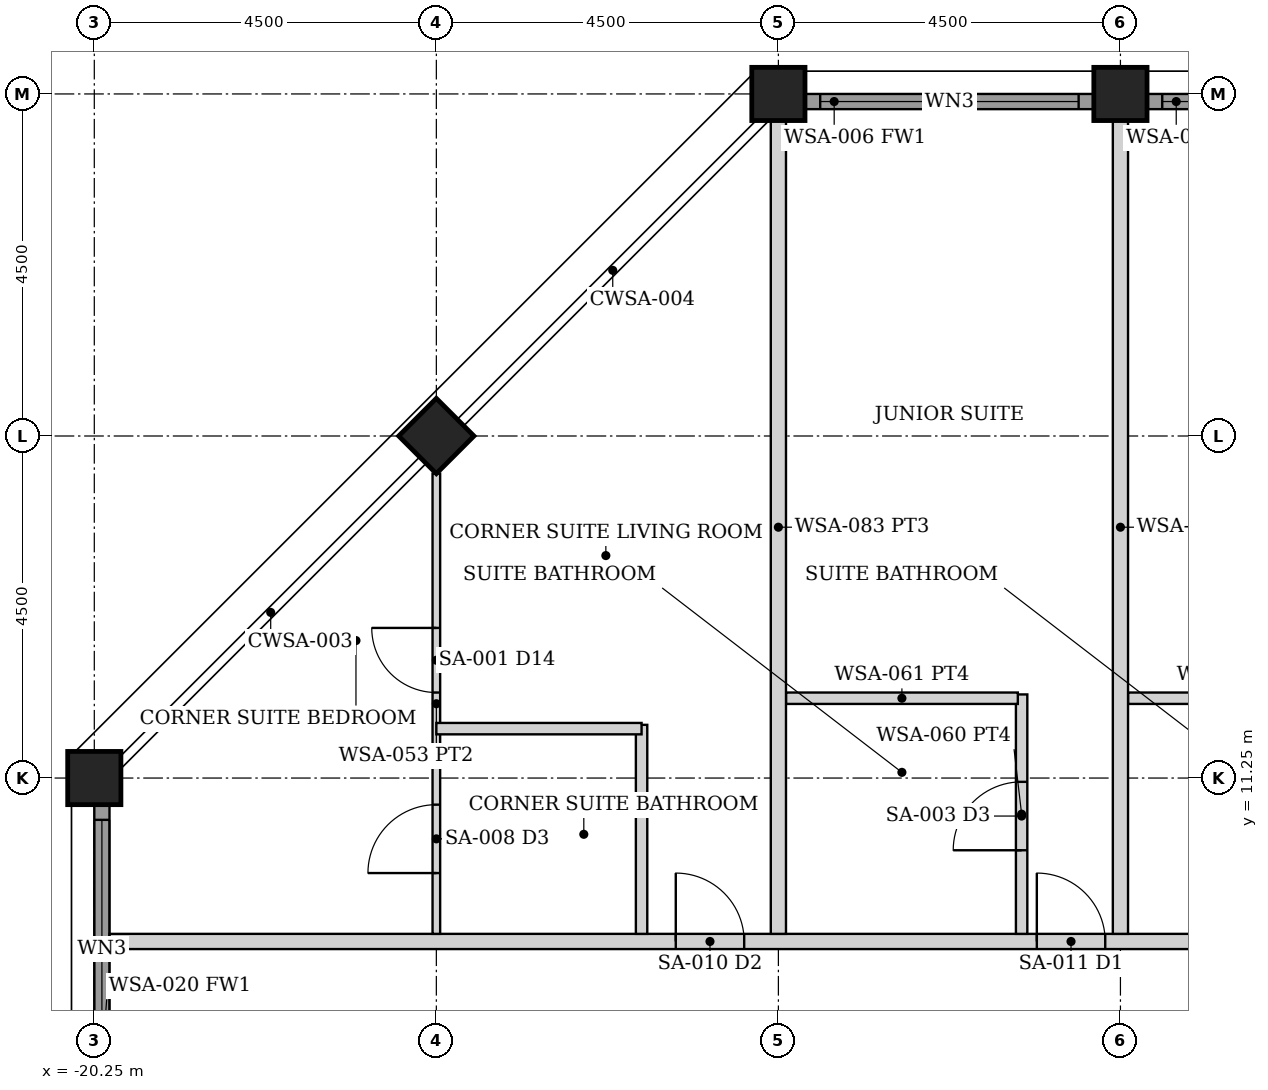
"""IFC4 building model, lengths in metres.
Left out: names, types, materials, properties, quantities, classifications, styles, units other than length and angle.
Written with IfcOpenShell. Run it as: python <this file> out.ifc"""

import sys

from ifc_helpers import new_model, si_unit, direction, frame, frame_2d, origin, origin_2d, place, context, subcontext, project, spatial, rectangle, hollow_rectangle, extrude, element, fill, save


model = new_model("IFC4")
c1 = context("Model", 3, precision=1e-05, world=origin(), true_north=direction((0.0, 1.0)))
c2 = subcontext(c1, "Body", "Model", "MODEL_VIEW")
j1 = project(units=[si_unit("LENGTHUNIT", "METRE"), si_unit("PLANEANGLEUNIT", "RADIAN")], contexts=[c1])
p1 = place(None, origin())
s1 = spatial("IfcSite", under=j1, at=p1, CompositionType="ELEMENT")
p2 = place(p1, origin())
s2 = spatial("IfcBuilding", under=s1, at=p2, CompositionType="ELEMENT")
p3 = place(p2, frame((0.0, 0.0, 200.8)))
s3 = spatial("IfcBuildingStorey", under=s2, at=p3, CompositionType="ELEMENT", Elevation=200.8)
for number, where, z_axis, x_axis in (
    (1, (-11.25, 20.25, 0.0), (0.0, 0.0, 1.0), (0.0, 1.0, 0.0)),
    (2, (-6.75, 20.25, 0.0), (0.0, 0.0, 1.0), (0.0, 1.0, 0.0)),
    (3, (-20.25, 11.25, 0.0), (0.0, 0.0, 1.0), (1.0, 0.0, 0.0)),
    (4, (-15.75, 15.75, 0.0), (0.0, 0.0, 1.0), (0.707, -0.707, 0.0)),
):
    element("IfcColumn", number, at=place(p3, frame(where, z_axis=z_axis, x_axis=x_axis)), inside=s3, PredefinedType="COLUMN", context=c2, shape_type="SweptSolid", body=[
        extrude(hollow_rectangle(XDim=0.7, YDim=0.7, WallThickness=0.045, at=origin_2d()), origin(), (0.0, 0.0, 1.0), 3.75),
    ])
p4 = place(p3, frame((-10.895, 20.15, 0.0), z_axis=(0.0, 0.0, 1.0), x_axis=(1.0, 0.0, 0.0)))
e5 = element("IfcWall", 5, at=p4, inside=s3, PredefinedType="SOLIDWALL", context=c2, shape_type="SweptSolid", body=[
    extrude(rectangle(XDim=3.79, YDim=0.2, at=frame_2d((1.895, 0.0))), origin(), (0.0, 0.0, 1.0), 2.629),
])
p5 = place(p4, frame((0.195, 0.0, 0.3)))
e6 = element("IfcOpeningElement", 6, at=p5, cuts=e5, PredefinedType="OPENING", context=c2, shape_type="SweptSolid", body=[
    extrude(rectangle(XDim=3.4, YDim=2.179, at=frame_2d((1.7, 1.089))), frame((0.0, 0.11, 0.0), z_axis=(0.0, -1.0, 0.0), x_axis=(1.0, 0.0, 0.0)), (0.0, 0.0, 1.0), 0.22),
])
p6 = place(p3, frame((-6.395, 20.15, 0.0), z_axis=(0.0, 0.0, 1.0), x_axis=(1.0, 0.0, 0.0)))
e7 = element("IfcWall", 7, at=p6, inside=s3, PredefinedType="SOLIDWALL", context=c2, shape_type="SweptSolid", body=[
    extrude(rectangle(XDim=3.79, YDim=0.2, at=frame_2d((1.895, 0.0))), origin(), (0.0, 0.0, 1.0), 2.629),
])
p7 = place(p6, frame((0.195, 0.0, 0.3)))
e8 = element("IfcOpeningElement", 8, at=p7, cuts=e7, PredefinedType="OPENING", context=c2, shape_type="SweptSolid", body=[
    extrude(rectangle(XDim=3.4, YDim=2.179, at=frame_2d((1.7, 1.089))), frame((0.0, 0.11, 0.0), z_axis=(0.0, -1.0, 0.0), x_axis=(1.0, 0.0, 0.0)), (0.0, 0.0, 1.0), 0.22),
])
p8 = place(p3, frame((-20.15, 7.105, 0.0), z_axis=(0.0, 0.0, 1.0), x_axis=(0.0, 1.0, 0.0)))
e9 = element("IfcWall", 9, at=p8, inside=s3, PredefinedType="SOLIDWALL", context=c2, shape_type="SweptSolid", body=[
    extrude(rectangle(XDim=3.79, YDim=0.2, at=frame_2d((1.895, 0.0))), origin(), (0.0, 0.0, 1.0), 2.629),
])
p9 = place(p8, frame((0.195, 0.0, 0.3)))
e10 = element("IfcOpeningElement", 10, at=p9, cuts=e9, PredefinedType="OPENING", context=c2, shape_type="SweptSolid", body=[
    extrude(rectangle(XDim=3.4, YDim=2.179, at=frame_2d((1.7, 1.089))), frame((0.0, 0.11, 0.0), z_axis=(0.0, -1.0, 0.0), x_axis=(1.0, 0.0, 0.0)), (0.0, 0.0, 1.0), 0.22),
])
p10 = place(p3, frame((-20.05, 9.1, 0.0), z_axis=(0.0, 0.0, 1.0), x_axis=(1.0, 0.0, 0.0)))
e11 = element("IfcWall", 11, at=p10, inside=s3, PredefinedType="PARTITIONING", context=c2, shape_type="SweptSolid", body=[
    extrude(rectangle(XDim=40.1, YDim=0.2, at=frame_2d((20.05, 0.0))), origin(), (0.0, 0.0, 1.0), 2.629),
])
p11 = place(p10, frame((12.2, 0.0, 0.0)))
e12 = element("IfcOpeningElement", 12, at=p11, cuts=e11, PredefinedType="OPENING", context=c2, shape_type="SweptSolid", body=[
    extrude(rectangle(XDim=0.9, YDim=2.1, at=frame_2d((0.45, 1.05))), frame((0.0, 0.11, 0.0), z_axis=(0.0, -1.0, 0.0), x_axis=(1.0, 0.0, 0.0)), (0.0, 0.0, 1.0), 0.22),
])
p12 = place(p10, frame((16.7, 0.0, 0.0)))
e13 = element("IfcOpeningElement", 13, at=p12, cuts=e11, PredefinedType="OPENING", context=c2, shape_type="SweptSolid", body=[
    extrude(rectangle(XDim=0.9, YDim=2.1, at=frame_2d((0.45, 1.05))), frame((0.0, 0.11, 0.0), z_axis=(0.0, -1.0, 0.0), x_axis=(1.0, 0.0, 0.0)), (0.0, 0.0, 1.0), 0.22),
])
p13 = place(p10, frame((21.2, 0.0, 0.0)))
e14 = element("IfcOpeningElement", 14, at=p13, cuts=e11, PredefinedType="OPENING", context=c2, shape_type="SweptSolid", body=[
    extrude(rectangle(XDim=0.9, YDim=2.1, at=frame_2d((0.45, 1.05))), frame((0.0, 0.11, 0.0), z_axis=(0.0, -1.0, 0.0), x_axis=(1.0, 0.0, 0.0)), (0.0, 0.0, 1.0), 0.22),
])
p14 = place(p10, frame((25.7, 0.0, 0.0)))
e15 = element("IfcOpeningElement", 15, at=p14, cuts=e11, PredefinedType="OPENING", context=c2, shape_type="SweptSolid", body=[
    extrude(rectangle(XDim=0.9, YDim=2.1, at=frame_2d((0.45, 1.05))), frame((0.0, 0.11, 0.0), z_axis=(0.0, -1.0, 0.0), x_axis=(1.0, 0.0, 0.0)), (0.0, 0.0, 1.0), 0.22),
])
p15 = place(p10, frame((30.2, 0.0, 0.0)))
e16 = element("IfcOpeningElement", 16, at=p15, cuts=e11, PredefinedType="OPENING", context=c2, shape_type="SweptSolid", body=[
    extrude(rectangle(XDim=0.9, YDim=2.1, at=frame_2d((0.45, 1.05))), frame((0.0, 0.11, 0.0), z_axis=(0.0, -1.0, 0.0), x_axis=(1.0, 0.0, 0.0)), (0.0, 0.0, 1.0), 0.22),
])
p16 = place(p10, frame((31.75, 0.0, 0.0)))
e17 = element("IfcOpeningElement", 17, at=p16, cuts=e11, PredefinedType="OPENING", context=c2, shape_type="SweptSolid", body=[
    extrude(rectangle(XDim=0.9, YDim=2.1, at=frame_2d((0.45, 1.05))), frame((0.0, 0.11, 0.0), z_axis=(0.0, -1.0, 0.0), x_axis=(1.0, 0.0, 0.0)), (0.0, 0.0, 1.0), 0.22),
])
p17 = place(p10, frame((7.45, 0.0, 0.0)))
e18 = element("IfcOpeningElement", 18, at=p17, cuts=e11, PredefinedType="OPENING", context=c2, shape_type="SweptSolid", body=[
    extrude(rectangle(XDim=0.9, YDim=2.1, at=frame_2d((0.45, 1.05))), frame((0.0, 0.11, 0.0), z_axis=(0.0, -1.0, 0.0), x_axis=(1.0, 0.0, 0.0)), (0.0, 0.0, 1.0), 0.22),
])
p18 = place(p3, frame((-8.05, 9.2, 0.0), z_axis=(0.0, 0.0, 1.0), x_axis=(0.0, 1.0, 0.0)))
e19 = element("IfcWall", 19, at=p18, inside=s3, PredefinedType="PARTITIONING", context=c2, shape_type="SweptSolid", body=[
    extrude(rectangle(XDim=3.15, YDim=0.15, at=frame_2d((1.575, 0.0))), origin(), (0.0, 0.0, 1.0), 2.629),
])
p19 = place(p18, frame((1.1, 0.0, 0.0)))
e20 = element("IfcOpeningElement", 20, at=p19, cuts=e19, PredefinedType="OPENING", context=c2, shape_type="SweptSolid", body=[
    extrude(rectangle(XDim=0.9, YDim=2.1, at=frame_2d((0.45, 1.05))), frame((0.0, 0.085, 0.0), z_axis=(0.0, -1.0, 0.0), x_axis=(1.0, 0.0, 0.0)), (0.0, 0.0, 1.0), 0.17),
])
for number, where, z_axis, x_axis in (
    (21, (-11.15, 12.3, 0.0), (0.0, 0.0, 1.0), (1.0, 0.0, 0.0)),
    (22, (-6.65, 12.3, 0.0), (0.0, 0.0, 1.0), (1.0, 0.0, 0.0)),
):
    element("IfcWall", number, at=place(p3, frame(where, z_axis=z_axis, x_axis=x_axis)), inside=s3, PredefinedType="PARTITIONING", context=c2, shape_type="SweptSolid", body=[
        extrude(rectangle(XDim=3.05, YDim=0.15, at=frame_2d((1.525, 0.0))), origin(), (0.0, 0.0, 1.0), 2.629),
    ])
for number, where, z_axis, x_axis in (
    (23, (-11.25, 9.2, 0.0), (0.0, 0.0, 1.0), (0.0, 1.0, 0.0)),
    (24, (-6.75, 9.2, 0.0), (0.0, 0.0, 1.0), (0.0, 1.0, 0.0)),
):
    element("IfcWall", number, at=place(p3, frame(where, z_axis=z_axis, x_axis=x_axis)), inside=s3, PredefinedType="PARTITIONING", context=c2, shape_type="SweptSolid", body=[
        extrude(rectangle(XDim=10.7, YDim=0.2, at=frame_2d((5.35, 0.0))), origin(), (0.0, 0.0, 1.0), 2.629),
    ])
p20 = place(p3, frame((-15.75, 9.2, 0.0), z_axis=(0.0, 0.0, 1.0), x_axis=(0.0, 1.0, 0.0)))
e25 = element("IfcWall", 25, at=p20, inside=s3, PredefinedType="PARTITIONING", context=c2, shape_type="SweptSolid", body=[
    extrude(rectangle(XDim=6.055, YDim=0.1, at=frame_2d((3.027, 0.0))), origin(), (0.0, 0.0, 1.0), 2.629),
])
p21 = place(p20, frame((3.175, 0.0, 0.0)))
e26 = element("IfcOpeningElement", 26, at=p21, cuts=e25, PredefinedType="OPENING", context=c2, shape_type="SweptSolid", body=[
    extrude(rectangle(XDim=0.85, YDim=2.1, at=frame_2d((0.425, 1.05))), frame((0.0, 0.06, 0.0), z_axis=(0.0, -1.0, 0.0), x_axis=(1.0, 0.0, 0.0)), (0.0, 0.0, 1.0), 0.12),
])
p22 = place(p20, frame((0.8, 0.0, 0.0)))
e27 = element("IfcOpeningElement", 27, at=p22, cuts=e25, PredefinedType="OPENING", context=c2, shape_type="SweptSolid", body=[
    extrude(rectangle(XDim=0.9, YDim=2.1, at=frame_2d((0.45, 1.05))), frame((0.0, 0.06, 0.0), z_axis=(0.0, -1.0, 0.0), x_axis=(1.0, 0.0, 0.0)), (0.0, 0.0, 1.0), 0.12),
])
p23 = place(p3, frame((-13.05, 9.2, 0.0), z_axis=(0.0, 0.0, 1.0), x_axis=(0.0, 1.0, 0.0)))
e28 = element("IfcWall", 28, at=p23, inside=s3, PredefinedType="PARTITIONING", context=c2, shape_type="SweptSolid", body=[
    extrude(rectangle(XDim=2.75, YDim=0.15, at=frame_2d((1.375, 0.0))), origin(), (0.0, 0.0, 1.0), 2.629),
])
p24 = place(p3, frame((-15.75, 11.9, 0.0), z_axis=(0.0, 0.0, 1.0), x_axis=(1.0, 0.0, 0.0)))
e29 = element("IfcWall", 29, at=p24, inside=s3, PredefinedType="PARTITIONING", context=c2, shape_type="SweptSolid", body=[
    extrude(rectangle(XDim=2.7, YDim=0.15, at=frame_2d((1.35, 0.0))), origin(), (0.0, 0.0, 1.0), 2.629),
])
p25 = place(p5, origin())
e30 = element("IfcWindow", 30, at=p25, inside=s3, PartitioningType="SINGLE_PANEL", PredefinedType="WINDOW", context=c2, shape_type="SweptSolid", body=[
    extrude(rectangle(XDim=3.4, YDim=2.179, at=frame_2d((1.7, 1.089))), frame((0.0, 0.03, 0.0), z_axis=(0.0, -1.0, 0.0), x_axis=(1.0, 0.0, 0.0)), (0.0, 0.0, 1.0), 0.06),
])
fill(e6, e30)
p26 = place(p7, origin())
e31 = element("IfcWindow", 31, at=p26, inside=s3, PartitioningType="SINGLE_PANEL", PredefinedType="WINDOW", context=c2, shape_type="SweptSolid", body=[
    extrude(rectangle(XDim=3.4, YDim=2.179, at=frame_2d((1.7, 1.089))), frame((0.0, 0.03, 0.0), z_axis=(0.0, -1.0, 0.0), x_axis=(1.0, 0.0, 0.0)), (0.0, 0.0, 1.0), 0.06),
])
fill(e8, e31)
p27 = place(p9, origin())
e32 = element("IfcWindow", 32, at=p27, inside=s3, PartitioningType="SINGLE_PANEL", PredefinedType="WINDOW", context=c2, shape_type="SweptSolid", body=[
    extrude(rectangle(XDim=3.4, YDim=2.179, at=frame_2d((1.7, 1.089))), frame((0.0, 0.03, 0.0), z_axis=(0.0, -1.0, 0.0), x_axis=(1.0, 0.0, 0.0)), (0.0, 0.0, 1.0), 0.06),
])
fill(e10, e32)
p28 = place(p11, origin())
e33 = element("IfcDoor", 33, at=p28, inside=s3, OperationType="SINGLE_SWING_LEFT", PredefinedType="DOOR", context=c2, shape_type="SweptSolid", body=[
    extrude(rectangle(XDim=0.9, YDim=2.1, at=frame_2d((0.45, 1.05))), frame((0.0, 0.025, 0.0), z_axis=(0.0, -1.0, 0.0), x_axis=(1.0, 0.0, 0.0)), (0.0, 0.0, 1.0), 0.05),
])
fill(e12, e33)
p29 = place(p19, origin())
e34 = element("IfcDoor", 34, at=p29, inside=s3, OperationType="SINGLE_SWING_LEFT", PredefinedType="DOOR", context=c2, shape_type="SweptSolid", body=[
    extrude(rectangle(XDim=0.9, YDim=2.1, at=frame_2d((0.45, 1.05))), frame((0.0, 0.025, 0.0), z_axis=(0.0, -1.0, 0.0), x_axis=(1.0, 0.0, 0.0)), (0.0, 0.0, 1.0), 0.05),
])
fill(e20, e34)
p30 = place(p17, origin())
e35 = element("IfcDoor", 35, at=p30, inside=s3, OperationType="SINGLE_SWING_LEFT", PredefinedType="DOOR", context=c2, shape_type="SweptSolid", body=[
    extrude(rectangle(XDim=0.9, YDim=2.1, at=frame_2d((0.45, 1.05))), frame((0.0, 0.025, 0.0), z_axis=(0.0, -1.0, 0.0), x_axis=(1.0, 0.0, 0.0)), (0.0, 0.0, 1.0), 0.05),
])
fill(e18, e35)
p31 = place(p21, origin())
e36 = element("IfcDoor", 36, at=p31, inside=s3, OperationType="SINGLE_SWING_RIGHT", PredefinedType="DOOR", context=c2, shape_type="SweptSolid", body=[
    extrude(rectangle(XDim=0.85, YDim=2.1, at=frame_2d((0.425, 1.05))), frame((0.0, 0.025, 0.0), z_axis=(0.0, -1.0, 0.0), x_axis=(1.0, 0.0, 0.0)), (0.0, 0.0, 1.0), 0.05),
])
fill(e26, e36)
p32 = place(p22, origin())
e37 = element("IfcDoor", 37, at=p32, inside=s3, OperationType="SINGLE_SWING_LEFT", PredefinedType="DOOR", context=c2, shape_type="SweptSolid", body=[
    extrude(rectangle(XDim=0.9, YDim=2.1, at=frame_2d((0.45, 1.05))), frame((0.0, 0.025, 0.0), z_axis=(0.0, -1.0, 0.0), x_axis=(1.0, 0.0, 0.0)), (0.0, 0.0, 1.0), 0.05),
])
fill(e27, e37)
save(model, sys.argv[1])
